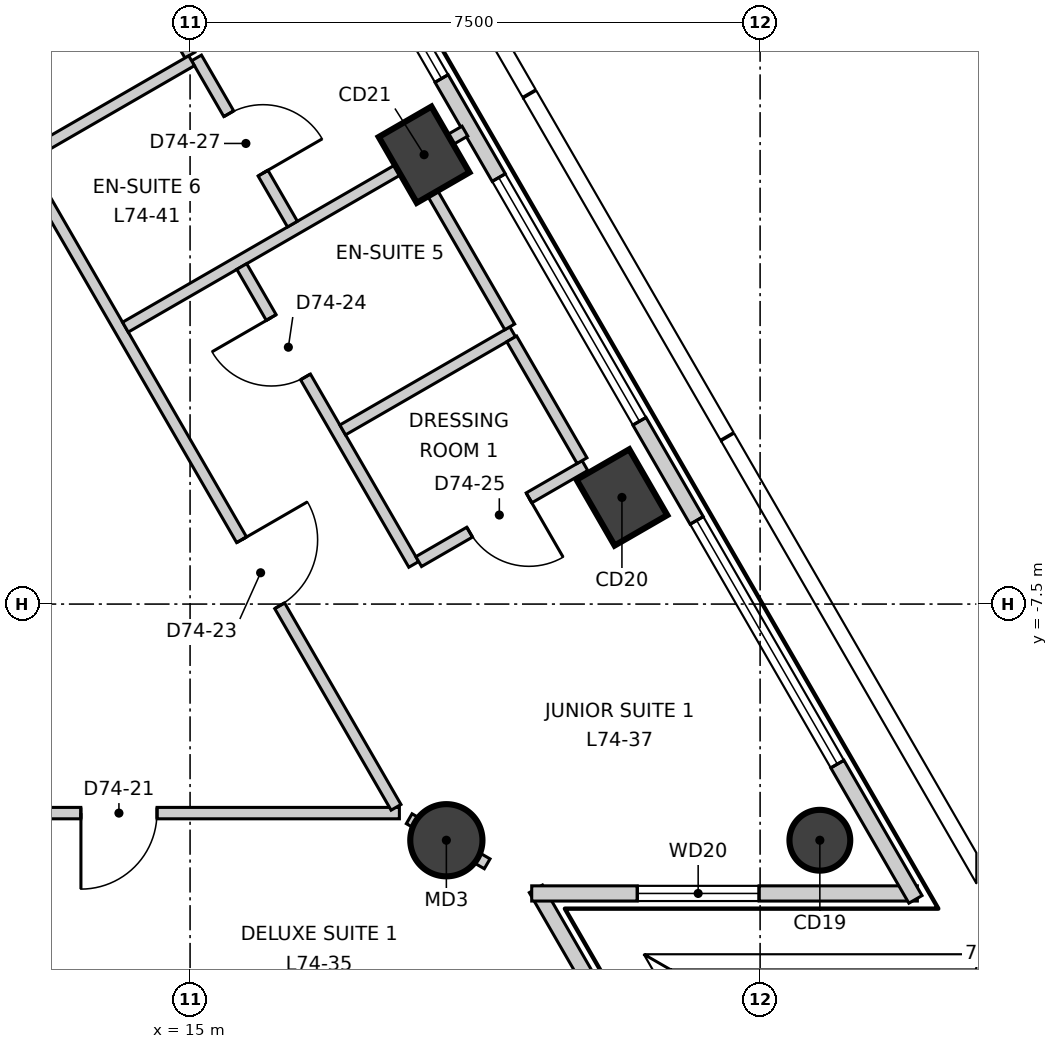
"""IFC4 building model, lengths in metres.
Left out: names, types, materials, properties, quantities, classifications, styles, units other than length and angle.
Written with IfcOpenShell. Run it as: python <this file> out.ifc"""

import sys

from ifc_helpers import new_model, si_unit, direction, frame, frame_2d, origin, origin_2d, place, context, subcontext, project, spatial, rectangle, circle, extrude, element, fill, save


model = new_model("IFC4")
c1 = context("Model", 3, precision=1e-05, world=origin(), true_north=direction((0.0, 1.0)))
c2 = subcontext(c1, "Body", "Model", "MODEL_VIEW")
j1 = project(units=[si_unit("LENGTHUNIT", "METRE"), si_unit("PLANEANGLEUNIT", "RADIAN")], contexts=[c1])
p1 = place(None, origin())
s1 = spatial("IfcSite", under=j1, at=p1, CompositionType="ELEMENT")
p2 = place(p1, origin())
s2 = spatial("IfcBuilding", under=s1, at=p2, CompositionType="ELEMENT")
p3 = place(p2, frame((0.0, 0.0, 311.5)))
s3 = spatial("IfcBuildingStorey", under=s2, at=p3, CompositionType="ELEMENT", Elevation=311.5)
p4 = place(p3, frame((23.286, -10.607, -0.3), z_axis=(0.0, 0.0, 1.0), x_axis=(-0.5, 0.866025403784, 0.0)))
e1 = element("IfcColumn", 1, at=p4, inside=s3, PredefinedType="COLUMN", context=c2, shape_type="SweptSolid", body=[
    extrude(circle(Radius=0.4, at=origin_2d()), origin(), (0.0, 0.0, 1.0), 3.6),
])
for number, where, z_axis, x_axis in (
    (2, (20.682, -6.097, -0.3), (0.0, 0.0, 1.0), (-0.5, 0.866, 0.0)),
    (3, (18.079, -1.588, -0.3), (0.0, 0.0, 1.0), (-0.5, 0.866, 0.0)),
):
    element("IfcColumn", number, at=place(p3, frame(where, z_axis=z_axis, x_axis=x_axis)), inside=s3, PredefinedType="COLUMN", context=c2, shape_type="SweptSolid", body=[
        extrude(rectangle(XDim=1.0, YDim=0.8, at=origin_2d()), origin(), (0.0, 0.0, 1.0), 3.6),
    ])
p5 = place(p3, frame((18.372, -10.607, -0.3), z_axis=(0.0, 0.0, 1.0), x_axis=(1.0, 0.0, 0.0)))
e4 = element("IfcColumn", 4, at=p5, inside=s3, PredefinedType="COLUMN", context=c2, shape_type="SweptSolid", body=[
    extrude(circle(Radius=0.475, at=origin_2d()), origin(), (0.0, 0.0, 1.0), 3.6),
])
p6 = place(p3, frame((22.087, -15.641, 0.0), z_axis=(0.0, 0.0, 1.0), x_axis=(-0.499911250765, 0.866076637116, 0.0)))
e5 = element("IfcWall", 5, at=p6, inside=s3, PredefinedType="ELEMENTEDWALL", context=c2, shape_type="SweptSolid", body=[
    extrude(rectangle(XDim=5.075, YDim=0.2, at=frame_2d((2.537, 0.0))), origin(), (0.0, 0.0, 1.0), 3.3),
])
p7 = place(p6, frame((1.99, 0.0, 0.9)))
e6 = element("IfcOpeningElement", 6, at=p7, cuts=e5, PredefinedType="OPENING", context=c2, shape_type="SweptSolid", body=[
    extrude(rectangle(XDim=1.6, YDim=2.2, at=frame_2d((0.8, 1.1))), frame((0.0, 0.11, 0.0), z_axis=(0.0, -1.0, 0.0), x_axis=(1.0, 0.0, 0.0)), (0.0, 0.0, 1.0), 0.22),
])
p8 = place(p3, frame((19.495, -11.307, 0.0), z_axis=(0.0, 0.0, 1.0), x_axis=(1.0, 0.0, 0.0)))
e7 = element("IfcWall", 7, at=p8, inside=s3, PredefinedType="ELEMENTEDWALL", context=c2, shape_type="SweptSolid", body=[
    extrude(rectangle(XDim=5.074, YDim=0.2, at=frame_2d((2.537, 0.0))), origin(), (0.0, 0.0, 1.0), 3.3),
])
p9 = place(p8, frame((1.39, 0.0, 0.9)))
e8 = element("IfcOpeningElement", 8, at=p9, cuts=e7, PredefinedType="OPENING", context=c2, shape_type="SweptSolid", body=[
    extrude(rectangle(XDim=1.6, YDim=2.2, at=frame_2d((0.8, 1.1))), frame((0.0, 0.11, 0.0), z_axis=(0.0, -1.0, 0.0), x_axis=(1.0, 0.0, 0.0)), (0.0, 0.0, 1.0), 0.22),
])
p10 = place(p3, frame((24.544, -11.385, 0.0), z_axis=(0.0, 0.0, 1.0), x_axis=(-0.500002044679, 0.866024223285, 0.0)))
e9 = element("IfcWall", 9, at=p10, inside=s3, PredefinedType="ELEMENTEDWALL", context=c2, shape_type="SweptSolid", body=[
    extrude(rectangle(XDim=44.243, YDim=0.2, at=frame_2d((22.122, 0.0))), origin(), (0.0, 0.0, 1.0), 3.3),
])
p11 = place(p10, frame((2.056, 0.0, 0.9)))
e10 = element("IfcOpeningElement", 10, at=p11, cuts=e9, PredefinedType="OPENING", context=c2, shape_type="SweptSolid", body=[
    extrude(rectangle(XDim=3.7, YDim=2.2, at=frame_2d((1.85, 1.1))), frame((0.0, 0.11, 0.0), z_axis=(0.0, -1.0, 0.0), x_axis=(1.0, 0.0, 0.0)), (0.0, 0.0, 1.0), 0.22),
])
p12 = place(p10, frame((7.264, 0.0, 0.9)))
e11 = element("IfcOpeningElement", 11, at=p12, cuts=e9, PredefinedType="OPENING", context=c2, shape_type="SweptSolid", body=[
    extrude(rectangle(XDim=3.7, YDim=2.2, at=frame_2d((1.85, 1.1))), frame((0.0, 0.11, 0.0), z_axis=(0.0, -1.0, 0.0), x_axis=(1.0, 0.0, 0.0)), (0.0, 0.0, 1.0), 0.22),
])
p13 = place(p10, frame((12.471, 0.0, 0.9)))
e12 = element("IfcOpeningElement", 12, at=p13, cuts=e9, PredefinedType="OPENING", context=c2, shape_type="SweptSolid", body=[
    extrude(rectangle(XDim=3.7, YDim=2.2, at=frame_2d((1.85, 1.1))), frame((0.0, 0.11, 0.0), z_axis=(0.0, -1.0, 0.0), x_axis=(1.0, 0.0, 0.0)), (0.0, 0.0, 1.0), 0.22),
])
p14 = place(p10, frame((17.678, 0.0, 0.9)))
e13 = element("IfcOpeningElement", 13, at=p14, cuts=e9, PredefinedType="OPENING", context=c2, shape_type="SweptSolid", body=[
    extrude(rectangle(XDim=3.7, YDim=2.2, at=frame_2d((1.85, 1.1))), frame((0.0, 0.11, 0.0), z_axis=(0.0, -1.0, 0.0), x_axis=(1.0, 0.0, 0.0)), (0.0, 0.0, 1.0), 0.22),
])
p15 = place(p10, frame((22.885, 0.0, 0.9)))
e14 = element("IfcOpeningElement", 14, at=p15, cuts=e9, PredefinedType="OPENING", context=c2, shape_type="SweptSolid", body=[
    extrude(rectangle(XDim=3.7, YDim=2.2, at=frame_2d((1.85, 1.1))), frame((0.0, 0.11, 0.0), z_axis=(0.0, -1.0, 0.0), x_axis=(1.0, 0.0, 0.0)), (0.0, 0.0, 1.0), 0.22),
])
p16 = place(p10, frame((28.093, 0.0, 0.9)))
e15 = element("IfcOpeningElement", 15, at=p16, cuts=e9, PredefinedType="OPENING", context=c2, shape_type="SweptSolid", body=[
    extrude(rectangle(XDim=3.7, YDim=2.2, at=frame_2d((1.85, 1.1))), frame((0.0, 0.11, 0.0), z_axis=(0.0, -1.0, 0.0), x_axis=(1.0, 0.0, 0.0)), (0.0, 0.0, 1.0), 0.22),
])
p17 = place(p10, frame((33.3, 0.0, 0.9)))
e16 = element("IfcOpeningElement", 16, at=p17, cuts=e9, PredefinedType="OPENING", context=c2, shape_type="SweptSolid", body=[
    extrude(rectangle(XDim=3.7, YDim=2.2, at=frame_2d((1.85, 1.1))), frame((0.0, 0.11, 0.0), z_axis=(0.0, -1.0, 0.0), x_axis=(1.0, 0.0, 0.0)), (0.0, 0.0, 1.0), 0.22),
])
p18 = place(p10, frame((38.507, 0.0, 0.9)))
e17 = element("IfcOpeningElement", 17, at=p18, cuts=e9, PredefinedType="OPENING", context=c2, shape_type="SweptSolid", body=[
    extrude(rectangle(XDim=3.7, YDim=2.2, at=frame_2d((1.85, 1.1))), frame((0.0, 0.11, 0.0), z_axis=(0.0, -1.0, 0.0), x_axis=(1.0, 0.0, 0.0)), (0.0, 0.0, 1.0), 0.22),
])
p19 = place(p3, frame((-17.604, -10.25, 0.0), z_axis=(0.0, 0.0, 1.0), x_axis=(1.0, 0.0, 0.0)))
e18 = element("IfcWall", 18, at=p19, inside=s3, PredefinedType="PARTITIONING", context=c2, shape_type="SweptSolid", body=[
    extrude(rectangle(XDim=35.358, YDim=0.15, at=frame_2d((17.679, 0.0))), origin(), (0.0, 0.0, 1.0), 3.3),
])
p20 = place(p19, frame((3.0, 0.0, 0.0)))
e19 = element("IfcOpeningElement", 19, at=p20, cuts=e18, PredefinedType="OPENING", context=c2, shape_type="SweptSolid", body=[
    extrude(rectangle(XDim=1.0, YDim=2.1, at=frame_2d((0.5, 1.05))), frame((0.0, 0.085, 0.0), z_axis=(0.0, -1.0, 0.0), x_axis=(1.0, 0.0, 0.0)), (0.0, 0.0, 1.0), 0.17),
])
p21 = place(p19, frame((15.14, 0.0, 0.0)))
e20 = element("IfcOpeningElement", 20, at=p21, cuts=e18, PredefinedType="OPENING", context=c2, shape_type="SweptSolid", body=[
    extrude(rectangle(XDim=1.0, YDim=2.1, at=frame_2d((0.5, 1.05))), frame((0.0, 0.085, 0.0), z_axis=(0.0, -1.0, 0.0), x_axis=(1.0, 0.0, 0.0)), (0.0, 0.0, 1.0), 0.17),
])
p22 = place(p19, frame((10.14, 0.0, 0.0)))
e21 = element("IfcOpeningElement", 21, at=p22, cuts=e18, PredefinedType="OPENING", context=c2, shape_type="SweptSolid", body=[
    extrude(rectangle(XDim=0.9, YDim=2.1, at=frame_2d((0.45, 1.05))), frame((0.0, 0.085, 0.0), z_axis=(0.0, -1.0, 0.0), x_axis=(1.0, 0.0, 0.0)), (0.0, 0.0, 1.0), 0.17),
])
p23 = place(p19, frame((12.24, 0.0, 0.0)))
e22 = element("IfcOpeningElement", 22, at=p23, cuts=e18, PredefinedType="OPENING", context=c2, shape_type="SweptSolid", body=[
    extrude(rectangle(XDim=0.9, YDim=2.1, at=frame_2d((0.45, 1.05))), frame((0.0, 0.085, 0.0), z_axis=(0.0, -1.0, 0.0), x_axis=(1.0, 0.0, 0.0)), (0.0, 0.0, 1.0), 0.17),
])
p24 = place(p19, frame((25.654, 0.0, 0.0)))
e23 = element("IfcOpeningElement", 23, at=p24, cuts=e18, PredefinedType="OPENING", context=c2, shape_type="SweptSolid", body=[
    extrude(rectangle(XDim=1.0, YDim=2.1, at=frame_2d((0.5, 1.05))), frame((0.0, 0.085, 0.0), z_axis=(0.0, -1.0, 0.0), x_axis=(1.0, 0.0, 0.0)), (0.0, 0.0, 1.0), 0.17),
])
p25 = place(p19, frame((20.554, 0.0, 0.0)))
e24 = element("IfcOpeningElement", 24, at=p25, cuts=e18, PredefinedType="OPENING", context=c2, shape_type="SweptSolid", body=[
    extrude(rectangle(XDim=0.9, YDim=2.1, at=frame_2d((0.45, 1.05))), frame((0.0, 0.085, 0.0), z_axis=(0.0, -1.0, 0.0), x_axis=(1.0, 0.0, 0.0)), (0.0, 0.0, 1.0), 0.17),
])
p26 = place(p19, frame((22.754, 0.0, 0.0)))
e25 = element("IfcOpeningElement", 25, at=p26, cuts=e18, PredefinedType="OPENING", context=c2, shape_type="SweptSolid", body=[
    extrude(rectangle(XDim=0.9, YDim=2.1, at=frame_2d((0.45, 1.05))), frame((0.0, 0.085, 0.0), z_axis=(0.0, -1.0, 0.0), x_axis=(1.0, 0.0, 0.0)), (0.0, 0.0, 1.0), 0.17),
])
p27 = place(p19, frame((31.168, 0.0, 0.0)))
e26 = element("IfcOpeningElement", 26, at=p27, cuts=e18, PredefinedType="OPENING", context=c2, shape_type="SweptSolid", body=[
    extrude(rectangle(XDim=1.0, YDim=2.1, at=frame_2d((0.5, 1.05))), frame((0.0, 0.085, 0.0), z_axis=(0.0, -1.0, 0.0), x_axis=(1.0, 0.0, 0.0)), (0.0, 0.0, 1.0), 0.17),
])
p28 = place(p3, frame((0.075, 20.37, 0.0), z_axis=(0.0, 0.0, 1.0), x_axis=(0.500006672087, -0.866021551619, 0.0)))
e27 = element("IfcWall", 27, at=p28, inside=s3, PredefinedType="PARTITIONING", context=c2, shape_type="SweptSolid", body=[
    extrude(rectangle(XDim=35.27, YDim=0.15, at=frame_2d((17.635, 0.0))), origin(), (0.0, 0.0, 1.0), 3.3),
])
p29 = place(p28, frame((31.206, 0.0, 0.0)))
e28 = element("IfcOpeningElement", 28, at=p29, cuts=e27, PredefinedType="OPENING", context=c2, shape_type="SweptSolid", body=[
    extrude(rectangle(XDim=1.0, YDim=2.1, at=frame_2d((0.5, 1.05))), frame((0.0, 0.085, 0.0), z_axis=(0.0, -1.0, 0.0), x_axis=(1.0, 0.0, 0.0)), (0.0, 0.0, 1.0), 0.17),
])
p30 = place(p28, frame((19.968, 0.0, 0.0)))
e29 = element("IfcOpeningElement", 29, at=p30, cuts=e27, PredefinedType="OPENING", context=c2, shape_type="SweptSolid", body=[
    extrude(rectangle(XDim=1.0, YDim=2.1, at=frame_2d((0.5, 1.05))), frame((0.0, 0.085, 0.0), z_axis=(0.0, -1.0, 0.0), x_axis=(1.0, 0.0, 0.0)), (0.0, 0.0, 1.0), 0.17),
])
p31 = place(p28, frame((13.353, 0.0, 0.0)))
e30 = element("IfcOpeningElement", 30, at=p31, cuts=e27, PredefinedType="OPENING", context=c2, shape_type="SweptSolid", body=[
    extrude(rectangle(XDim=1.0, YDim=2.1, at=frame_2d((0.5, 1.05))), frame((0.0, 0.085, 0.0), z_axis=(0.0, -1.0, 0.0), x_axis=(1.0, 0.0, 0.0)), (0.0, 0.0, 1.0), 0.17),
])
p32 = place(p28, frame((7.746, 0.0, 0.0)))
e31 = element("IfcOpeningElement", 31, at=p32, cuts=e27, PredefinedType="OPENING", context=c2, shape_type="SweptSolid", body=[
    extrude(rectangle(XDim=1.0, YDim=2.1, at=frame_2d((0.5, 1.05))), frame((0.0, 0.085, 0.0), z_axis=(0.0, -1.0, 0.0), x_axis=(1.0, 0.0, 0.0)), (0.0, 0.0, 1.0), 0.17),
])
p33 = place(p28, frame((3.038, 0.0, 0.0)))
e32 = element("IfcOpeningElement", 32, at=p33, cuts=e27, PredefinedType="OPENING", context=c2, shape_type="SweptSolid", body=[
    extrude(rectangle(XDim=1.0, YDim=2.1, at=frame_2d((0.5, 1.05))), frame((0.0, 0.085, 0.0), z_axis=(0.0, -1.0, 0.0), x_axis=(1.0, 0.0, 0.0)), (0.0, 0.0, 1.0), 0.17),
])
p34 = place(p3, frame((14.149, -3.857, 0.0), z_axis=(0.0, 0.0, 1.0), x_axis=(0.86604134632, 0.499972385701, 0.0)))
e33 = element("IfcWall", 33, at=p34, inside=s3, PredefinedType="PARTITIONING", context=c2, shape_type="SweptSolid", body=[
    extrude(rectangle(XDim=5.158, YDim=0.15, at=frame_2d((2.579, 0.0))), origin(), (0.0, 0.0, 1.0), 3.3),
])
p35 = place(p3, frame((17.883, -10.324, 0.0), z_axis=(0.0, 0.0, 1.0), x_axis=(0.865759938798, -0.500459517216, 0.0)))
e34 = element("IfcWall", 34, at=p35, inside=s3, PredefinedType="PARTITIONING", context=c2, shape_type="SweptSolid", body=[
    extrude(rectangle(XDim=1.185, YDim=0.15, at=frame_2d((0.593, 0.0))), origin(), (0.0, 0.0, 1.0), 2.8),
])
p36 = place(p3, frame((15.085, -0.315, 0.0), z_axis=(0.0, 0.0, 1.0), x_axis=(0.499956887143, -0.866050293573, 0.0)))
e35 = element("IfcWall", 35, at=p36, inside=s3, PredefinedType="PARTITIONING", context=c2, shape_type="SweptSolid", body=[
    extrude(rectangle(XDim=2.524, YDim=0.15, at=frame_2d((1.262, 0.0))), origin(), (0.0, 0.0, 1.0), 3.3),
])
p37 = place(p36, frame((0.849, 0.0, 0.0)))
e36 = element("IfcOpeningElement", 36, at=p37, cuts=e35, PredefinedType="OPENING", context=c2, shape_type="SweptSolid", body=[
    extrude(rectangle(XDim=0.9, YDim=2.1, at=frame_2d((0.45, 1.05))), frame((0.0, 0.085, 0.0), z_axis=(0.0, -1.0, 0.0), x_axis=(1.0, 0.0, 0.0)), (0.0, 0.0, 1.0), 0.17),
])
p38 = place(p3, frame((14.036, 1.389, 0.0), z_axis=(0.0, 0.0, 1.0), x_axis=(0.499890818081, -0.866088430819, 0.0)))
e37 = element("IfcWall", 37, at=p38, inside=s3, PredefinedType="PARTITIONING", context=c2, shape_type="SweptSolid", body=[
    extrude(rectangle(XDim=1.925, YDim=0.15, at=frame_2d((0.962, 0.0))), origin(), (0.0, 0.0, 1.0), 3.3),
])
p39 = place(p3, frame((12.849, -1.605, 0.0), z_axis=(0.0, 0.0, 1.0), x_axis=(0.866101252082, 0.499868603878, 0.0)))
e38 = element("IfcWall", 38, at=p39, inside=s3, PredefinedType="PARTITIONING", context=c2, shape_type="SweptSolid", body=[
    extrude(rectangle(XDim=2.507, YDim=0.15, at=frame_2d((1.253, 0.0))), origin(), (0.0, 0.0, 1.0), 3.3),
])
p40 = place(p3, frame((15.68, -3.059, 0.0), z_axis=(0.0, 0.0, 1.0), x_axis=(0.500096029888, -0.865969953804, 0.0)))
e39 = element("IfcWall", 39, at=p40, inside=s3, PredefinedType="PARTITIONING", context=c2, shape_type="SweptSolid", body=[
    extrude(rectangle(XDim=4.525, YDim=0.15, at=frame_2d((2.263, 0.0))), origin(), (0.0, 0.0, 1.0), 3.3),
])
p41 = place(p40, frame((0.776, 0.0, 0.0)))
e40 = element("IfcOpeningElement", 40, at=p41, cuts=e39, PredefinedType="OPENING", context=c2, shape_type="SweptSolid", body=[
    extrude(rectangle(XDim=0.9, YDim=2.1, at=frame_2d((0.45, 1.05))), frame((0.0, 0.085, 0.0), z_axis=(0.0, -1.0, 0.0), x_axis=(1.0, 0.0, 0.0)), (0.0, 0.0, 1.0), 0.17),
])
p42 = place(p3, frame((17.008, -5.209, 0.0), z_axis=(0.0, 0.0, 1.0), x_axis=(0.865999760466, 0.500044412901, 0.0)))
e41 = element("IfcWall", 41, at=p42, inside=s3, PredefinedType="PARTITIONING", context=c2, shape_type="SweptSolid", body=[
    extrude(rectangle(XDim=2.582, YDim=0.15, at=frame_2d((1.291, 0.0))), origin(), (0.0, 0.0, 1.0), 3.3),
])
p43 = place(p3, frame((18.008, -6.941, 0.0), z_axis=(0.0, 0.0, 1.0), x_axis=(0.865979509711, 0.500079482444, 0.0)))
e42 = element("IfcWall", 42, at=p43, inside=s3, PredefinedType="PARTITIONING", context=c2, shape_type="SweptSolid", body=[
    extrude(rectangle(XDim=2.525, YDim=0.15, at=frame_2d((1.263, 0.0))), origin(), (0.0, 0.0, 1.0), 3.3),
])
p44 = place(p43, frame((0.775, 0.0, 0.0)))
e43 = element("IfcOpeningElement", 43, at=p44, cuts=e42, PredefinedType="OPENING", context=c2, shape_type="SweptSolid", body=[
    extrude(rectangle(XDim=0.9, YDim=2.1, at=frame_2d((0.45, 1.05))), frame((0.0, 0.085, 0.0), z_axis=(0.0, -1.0, 0.0), x_axis=(1.0, 0.0, 0.0)), (0.0, 0.0, 1.0), 0.17),
])
p45 = place(p3, frame((19.232, -4.011, 0.0), z_axis=(0.0, 0.0, 1.0), x_axis=(0.500042316284, -0.866000971088, 0.0)))
e44 = element("IfcWall", 44, at=p45, inside=s3, PredefinedType="PARTITIONING", context=c2, shape_type="SweptSolid", body=[
    extrude(rectangle(XDim=1.85, YDim=0.15, at=frame_2d((0.925, 0.0))), origin(), (0.0, 0.0, 1.0), 2.6),
])
p46 = place(p3, frame((17.981, -1.731, 0.0), z_axis=(0.0, 0.0, 1.0), x_axis=(0.499975448907, -0.8660395779, 0.0)))
e45 = element("IfcWall", 45, at=p46, inside=s3, PredefinedType="PARTITIONING", context=c2, shape_type="SweptSolid", body=[
    extrude(rectangle(XDim=2.45, YDim=0.15, at=frame_2d((1.225, 0.0))), origin(), (0.0, 0.0, 1.0), 2.6),
])
p47 = place(p9, origin())
e46 = element("IfcWindow", 46, at=p47, inside=s3, PartitioningType="SINGLE_PANEL", PredefinedType="WINDOW", context=c2, shape_type="SweptSolid", body=[
    extrude(rectangle(XDim=1.6, YDim=2.2, at=frame_2d((0.8, 1.1))), frame((0.0, 0.03, 0.0), z_axis=(0.0, -1.0, 0.0), x_axis=(1.0, 0.0, 0.0)), (0.0, 0.0, 1.0), 0.06),
])
fill(e8, e46)
p48 = place(p11, origin())
e47 = element("IfcWindow", 47, at=p48, inside=s3, PartitioningType="SINGLE_PANEL", PredefinedType="WINDOW", context=c2, shape_type="SweptSolid", body=[
    extrude(rectangle(XDim=3.7, YDim=2.2, at=frame_2d((1.85, 1.1))), frame((0.0, 0.03, 0.0), z_axis=(0.0, -1.0, 0.0), x_axis=(1.0, 0.0, 0.0)), (0.0, 0.0, 1.0), 0.06),
])
fill(e10, e47)
p49 = place(p12, origin())
e48 = element("IfcWindow", 48, at=p49, inside=s3, PartitioningType="SINGLE_PANEL", PredefinedType="WINDOW", context=c2, shape_type="SweptSolid", body=[
    extrude(rectangle(XDim=3.7, YDim=2.2, at=frame_2d((1.85, 1.1))), frame((0.0, 0.03, 0.0), z_axis=(0.0, -1.0, 0.0), x_axis=(1.0, 0.0, 0.0)), (0.0, 0.0, 1.0), 0.06),
])
fill(e11, e48)
p50 = place(p13, origin())
e49 = element("IfcWindow", 49, at=p50, inside=s3, PartitioningType="SINGLE_PANEL", PredefinedType="WINDOW", context=c2, shape_type="SweptSolid", body=[
    extrude(rectangle(XDim=3.7, YDim=2.2, at=frame_2d((1.85, 1.1))), frame((0.0, 0.03, 0.0), z_axis=(0.0, -1.0, 0.0), x_axis=(1.0, 0.0, 0.0)), (0.0, 0.0, 1.0), 0.06),
])
fill(e12, e49)
p51 = place(p27, origin())
e50 = element("IfcDoor", 50, at=p51, inside=s3, OperationType="SINGLE_SWING_LEFT", PredefinedType="DOOR", context=c2, shape_type="SweptSolid", body=[
    extrude(rectangle(XDim=1.0, YDim=2.1, at=frame_2d((0.5, 1.05))), frame((0.0, 0.025, 0.0), z_axis=(0.0, -1.0, 0.0), x_axis=(1.0, 0.0, 0.0)), (0.0, 0.0, 1.0), 0.05),
])
fill(e26, e50)
p52 = place(p29, origin())
e51 = element("IfcDoor", 51, at=p52, inside=s3, OperationType="SINGLE_SWING_RIGHT", PredefinedType="DOOR", context=c2, shape_type="SweptSolid", body=[
    extrude(rectangle(XDim=1.0, YDim=2.1, at=frame_2d((0.5, 1.05))), frame((0.0, 0.025, 0.0), z_axis=(0.0, -1.0, 0.0), x_axis=(1.0, 0.0, 0.0)), (0.0, 0.0, 1.0), 0.05),
])
fill(e28, e51)
p53 = place(p41, origin())
e52 = element("IfcDoor", 52, at=p53, inside=s3, OperationType="SINGLE_SWING_LEFT", PredefinedType="DOOR", context=c2, shape_type="SweptSolid", body=[
    extrude(rectangle(XDim=0.9, YDim=2.1, at=frame_2d((0.45, 1.05))), frame((0.0, 0.025, 0.0), z_axis=(0.0, -1.0, 0.0), x_axis=(1.0, 0.0, 0.0)), (0.0, 0.0, 1.0), 0.05),
])
fill(e40, e52)
p54 = place(p44, origin())
e53 = element("IfcDoor", 53, at=p54, inside=s3, OperationType="SINGLE_SWING_RIGHT", PredefinedType="DOOR", context=c2, shape_type="SweptSolid", body=[
    extrude(rectangle(XDim=0.9, YDim=2.1, at=frame_2d((0.45, 1.05))), frame((0.0, 0.025, 0.0), z_axis=(0.0, -1.0, 0.0), x_axis=(1.0, 0.0, 0.0)), (0.0, 0.0, 1.0), 0.05),
])
fill(e43, e53)
p55 = place(p37, origin())
e54 = element("IfcDoor", 54, at=p55, inside=s3, OperationType="SINGLE_SWING_LEFT", PredefinedType="DOOR", context=c2, shape_type="SweptSolid", body=[
    extrude(rectangle(XDim=0.9, YDim=2.1, at=frame_2d((0.45, 1.05))), frame((0.0, 0.025, 0.0), z_axis=(0.0, -1.0, 0.0), x_axis=(1.0, 0.0, 0.0)), (0.0, 0.0, 1.0), 0.05),
])
fill(e36, e54)
save(model, sys.argv[1])
